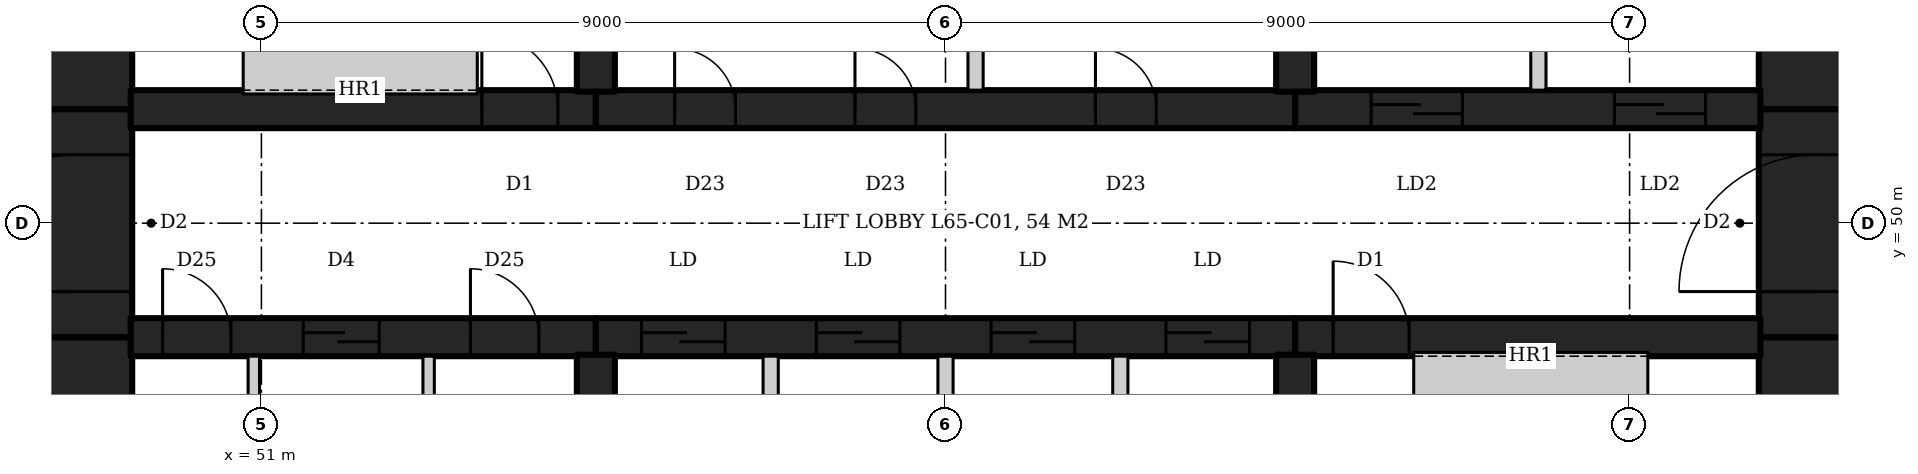
"""IFC4 building model, lengths in metres.
Left out: names, types, materials, properties, quantities, classifications, styles, units other than length and angle.
Written with IfcOpenShell. Run it as: python <this file> out.ifc"""

import sys

from ifc_helpers import new_model, si_unit, direction, frame, frame_2d, origin, place, context, subcontext, project, spatial, rectangle, extrude, element, fill, save


model = new_model("IFC4")
c1 = context("Model", 3, precision=1e-05, world=origin(), true_north=direction((0.0, 1.0)))
c2 = subcontext(c1, "Body", "Model", "MODEL_VIEW")
j1 = project(units=[si_unit("LENGTHUNIT", "METRE"), si_unit("PLANEANGLEUNIT", "RADIAN")], contexts=[c1])
p1 = place(None, origin())
s1 = spatial("IfcSite", under=j1, at=p1, CompositionType="ELEMENT")
p2 = place(p1, origin())
s2 = spatial("IfcBuilding", under=s1, at=p2, CompositionType="ELEMENT")
p3 = place(p2, frame((0.0, 0.0, 278.0)))
s3 = spatial("IfcBuildingStorey", under=s2, at=p3, CompositionType="ELEMENT", Elevation=278.0)
p4 = place(p3, frame((71.45, 45.28, 0.0), z_axis=(0.0, 0.0, 1.0), x_axis=(0.0, 1.0, 0.0)))
e1 = element("IfcWall", 1, at=p4, inside=s3, PredefinedType="SHEAR", context=c2, shape_type="SweptSolid", body=[
    extrude(rectangle(XDim=3.22, YDim=1.5, at=frame_2d((1.61, 0.0))), origin(), (0.0, 0.0, 1.0), 4.2),
])
p5 = place(p3, frame((71.45, 48.5, 0.0), z_axis=(0.0, 0.0, 1.0), x_axis=(0.0, 1.0, 0.0)))
e2 = element("IfcWall", 2, at=p5, inside=s3, PredefinedType="SHEAR", context=c2, shape_type="SweptSolid", body=[
    extrude(rectangle(XDim=3.0, YDim=1.5, at=frame_2d((1.5, 0.0))), origin(), (0.0, 0.0, 1.0), 4.2),
])
p6 = place(p5, frame((0.6, 0.0, 0.0)))
e3 = element("IfcOpeningElement", 3, at=p6, cuts=e2, PredefinedType="OPENING", context=c2, shape_type="SweptSolid", body=[
    extrude(rectangle(XDim=1.8, YDim=2.1, at=frame_2d((0.9, 1.05))), frame((0.0, 0.76, 0.0), z_axis=(0.0, -1.0, 0.0), x_axis=(1.0, 0.0, 0.0)), (0.0, 0.0, 1.0), 1.52),
])
for number, where, z_axis, x_axis in (
    (4, (71.45, 51.5, 0.0), (0.0, 0.0, 1.0), (0.0, 1.0, 0.0)),
    (5, (48.55, 45.28, 0.0), (0.0, 0.0, 1.0), (0.0, 1.0, 0.0)),
):
    element("IfcWall", number, at=place(p3, frame(where, z_axis=z_axis, x_axis=x_axis)), inside=s3, PredefinedType="SHEAR", context=c2, shape_type="SweptSolid", body=[
        extrude(rectangle(XDim=3.22, YDim=1.5, at=frame_2d((1.61, 0.0))), origin(), (0.0, 0.0, 1.0), 4.2),
    ])
p7 = place(p3, frame((48.55, 48.5, 0.0), z_axis=(0.0, 0.0, 1.0), x_axis=(0.0, 1.0, 0.0)))
e6 = element("IfcWall", 6, at=p7, inside=s3, PredefinedType="SHEAR", context=c2, shape_type="SweptSolid", body=[
    extrude(rectangle(XDim=3.0, YDim=1.5, at=frame_2d((1.5, 0.0))), origin(), (0.0, 0.0, 1.0), 4.2),
])
p8 = place(p7, frame((0.6, 0.0, 0.0)))
e7 = element("IfcOpeningElement", 7, at=p8, cuts=e6, PredefinedType="OPENING", context=c2, shape_type="SweptSolid", body=[
    extrude(rectangle(XDim=1.8, YDim=2.1, at=frame_2d((0.9, 1.05))), frame((0.0, 0.76, 0.0), z_axis=(0.0, -1.0, 0.0), x_axis=(1.0, 0.0, 0.0)), (0.0, 0.0, 1.0), 1.52),
])
p9 = place(p3, frame((48.55, 51.5, 0.0), z_axis=(0.0, 0.0, 1.0), x_axis=(0.0, 1.0, 0.0)))
e8 = element("IfcWall", 8, at=p9, inside=s3, PredefinedType="SHEAR", context=c2, shape_type="SweptSolid", body=[
    extrude(rectangle(XDim=3.22, YDim=1.5, at=frame_2d((1.61, 0.0))), origin(), (0.0, 0.0, 1.0), 4.2),
])
p10 = place(p3, frame((49.28, 51.5, 0.0), z_axis=(0.0, 0.0, 1.0), x_axis=(1.0, 0.0, 0.0)))
e9 = element("IfcWall", 9, at=p10, inside=s3, PredefinedType="SHEAR", context=c2, shape_type="SweptSolid", body=[
    extrude(rectangle(XDim=6.12, YDim=0.5, at=frame_2d((3.06, 0.0))), origin(), (0.0, 0.0, 1.0), 4.2),
])
p11 = place(p10, frame((4.62, 0.0, 0.0)))
e10 = element("IfcOpeningElement", 10, at=p11, cuts=e9, PredefinedType="OPENING", context=c2, shape_type="SweptSolid", body=[
    extrude(rectangle(XDim=1.0, YDim=2.1, at=frame_2d((0.5, 1.05))), frame((0.0, 0.26, 0.0), z_axis=(0.0, -1.0, 0.0), x_axis=(1.0, 0.0, 0.0)), (0.0, 0.0, 1.0), 0.52),
])
p12 = place(p3, frame((55.4, 51.5, 0.0), z_axis=(0.0, 0.0, 1.0), x_axis=(1.0, 0.0, 0.0)))
e11 = element("IfcWall", 11, at=p12, inside=s3, PredefinedType="SHEAR", context=c2, shape_type="SweptSolid", body=[
    extrude(rectangle(XDim=9.2, YDim=0.5, at=frame_2d((4.6, 0.0))), origin(), (0.0, 0.0, 1.0), 4.2),
])
p13 = place(p12, frame((1.036, 0.0, 0.0)))
e12 = element("IfcOpeningElement", 12, at=p13, cuts=e11, PredefinedType="OPENING", context=c2, shape_type="SweptSolid", body=[
    extrude(rectangle(XDim=0.8, YDim=2.1, at=frame_2d((0.4, 1.05))), frame((0.0, 0.26, 0.0), z_axis=(0.0, -1.0, 0.0), x_axis=(1.0, 0.0, 0.0)), (0.0, 0.0, 1.0), 0.52),
])
p14 = place(p12, frame((3.409, 0.0, 0.0)))
e13 = element("IfcOpeningElement", 13, at=p14, cuts=e11, PredefinedType="OPENING", context=c2, shape_type="SweptSolid", body=[
    extrude(rectangle(XDim=0.8, YDim=2.1, at=frame_2d((0.4, 1.05))), frame((0.0, 0.26, 0.0), z_axis=(0.0, -1.0, 0.0), x_axis=(1.0, 0.0, 0.0)), (0.0, 0.0, 1.0), 0.52),
])
p15 = place(p12, frame((6.573, 0.0, 0.0)))
e14 = element("IfcOpeningElement", 14, at=p15, cuts=e11, PredefinedType="OPENING", context=c2, shape_type="SweptSolid", body=[
    extrude(rectangle(XDim=0.8, YDim=2.1, at=frame_2d((0.4, 1.05))), frame((0.0, 0.26, 0.0), z_axis=(0.0, -1.0, 0.0), x_axis=(1.0, 0.0, 0.0)), (0.0, 0.0, 1.0), 0.52),
])
p16 = place(p3, frame((64.6, 51.5, 0.0), z_axis=(0.0, 0.0, 1.0), x_axis=(1.0, 0.0, 0.0)))
e15 = element("IfcWall", 15, at=p16, inside=s3, PredefinedType="SHEAR", context=c2, shape_type="SweptSolid", body=[
    extrude(rectangle(XDim=6.12, YDim=0.5, at=frame_2d((3.06, 0.0))), origin(), (0.0, 0.0, 1.0), 4.2),
])
p17 = place(p16, frame((1.0, 0.0, 0.0)))
e16 = element("IfcOpeningElement", 16, at=p17, cuts=e15, PredefinedType="OPENING", context=c2, shape_type="SweptSolid", body=[
    extrude(rectangle(XDim=1.2, YDim=2.1, at=frame_2d((0.6, 1.05))), frame((0.0, 0.26, 0.0), z_axis=(0.0, -1.0, 0.0), x_axis=(1.0, 0.0, 0.0)), (0.0, 0.0, 1.0), 0.52),
])
p18 = place(p16, frame((4.2, 0.0, 0.0)))
e17 = element("IfcOpeningElement", 17, at=p18, cuts=e15, PredefinedType="OPENING", context=c2, shape_type="SweptSolid", body=[
    extrude(rectangle(XDim=1.2, YDim=2.1, at=frame_2d((0.6, 1.05))), frame((0.0, 0.26, 0.0), z_axis=(0.0, -1.0, 0.0), x_axis=(1.0, 0.0, 0.0)), (0.0, 0.0, 1.0), 0.52),
])
p19 = place(p3, frame((49.28, 48.5, 0.0), z_axis=(0.0, 0.0, 1.0), x_axis=(1.0, 0.0, 0.0)))
e18 = element("IfcWall", 18, at=p19, inside=s3, PredefinedType="SHEAR", context=c2, shape_type="SweptSolid", body=[
    extrude(rectangle(XDim=6.12, YDim=0.5, at=frame_2d((3.06, 0.0))), origin(), (0.0, 0.0, 1.0), 4.2),
])
p20 = place(p19, frame((0.42, 0.0, 0.0)))
e19 = element("IfcOpeningElement", 19, at=p20, cuts=e18, PredefinedType="OPENING", context=c2, shape_type="SweptSolid", body=[
    extrude(rectangle(XDim=0.9, YDim=2.1, at=frame_2d((0.45, 1.05))), frame((0.0, 0.26, 0.0), z_axis=(0.0, -1.0, 0.0), x_axis=(1.0, 0.0, 0.0)), (0.0, 0.0, 1.0), 0.52),
])
p21 = place(p19, frame((2.27, 0.0, 0.0)))
e20 = element("IfcOpeningElement", 20, at=p21, cuts=e18, PredefinedType="OPENING", context=c2, shape_type="SweptSolid", body=[
    extrude(rectangle(XDim=1.0, YDim=2.1, at=frame_2d((0.5, 1.05))), frame((0.0, 0.26, 0.0), z_axis=(0.0, -1.0, 0.0), x_axis=(1.0, 0.0, 0.0)), (0.0, 0.0, 1.0), 0.52),
])
p22 = place(p19, frame((4.47, 0.0, 0.0)))
e21 = element("IfcOpeningElement", 21, at=p22, cuts=e18, PredefinedType="OPENING", context=c2, shape_type="SweptSolid", body=[
    extrude(rectangle(XDim=0.9, YDim=2.1, at=frame_2d((0.45, 1.05))), frame((0.0, 0.26, 0.0), z_axis=(0.0, -1.0, 0.0), x_axis=(1.0, 0.0, 0.0)), (0.0, 0.0, 1.0), 0.52),
])
p23 = place(p3, frame((55.4, 48.5, 0.0), z_axis=(0.0, 0.0, 1.0), x_axis=(1.0, 0.0, 0.0)))
e22 = element("IfcWall", 22, at=p23, inside=s3, PredefinedType="SHEAR", context=c2, shape_type="SweptSolid", body=[
    extrude(rectangle(XDim=9.2, YDim=0.5, at=frame_2d((4.6, 0.0))), origin(), (0.0, 0.0, 1.0), 4.2),
])
p24 = place(p23, frame((0.6, 0.0, 0.0)))
e23 = element("IfcOpeningElement", 23, at=p24, cuts=e22, PredefinedType="OPENING", context=c2, shape_type="SweptSolid", body=[
    extrude(rectangle(XDim=1.1, YDim=2.1, at=frame_2d((0.55, 1.05))), frame((0.0, 0.26, 0.0), z_axis=(0.0, -1.0, 0.0), x_axis=(1.0, 0.0, 0.0)), (0.0, 0.0, 1.0), 0.52),
])
p25 = place(p23, frame((2.9, 0.0, 0.0)))
e24 = element("IfcOpeningElement", 24, at=p25, cuts=e22, PredefinedType="OPENING", context=c2, shape_type="SweptSolid", body=[
    extrude(rectangle(XDim=1.1, YDim=2.1, at=frame_2d((0.55, 1.05))), frame((0.0, 0.26, 0.0), z_axis=(0.0, -1.0, 0.0), x_axis=(1.0, 0.0, 0.0)), (0.0, 0.0, 1.0), 0.52),
])
p26 = place(p23, frame((5.2, 0.0, 0.0)))
e25 = element("IfcOpeningElement", 25, at=p26, cuts=e22, PredefinedType="OPENING", context=c2, shape_type="SweptSolid", body=[
    extrude(rectangle(XDim=1.1, YDim=2.1, at=frame_2d((0.55, 1.05))), frame((0.0, 0.26, 0.0), z_axis=(0.0, -1.0, 0.0), x_axis=(1.0, 0.0, 0.0)), (0.0, 0.0, 1.0), 0.52),
])
p27 = place(p23, frame((7.5, 0.0, 0.0)))
e26 = element("IfcOpeningElement", 26, at=p27, cuts=e22, PredefinedType="OPENING", context=c2, shape_type="SweptSolid", body=[
    extrude(rectangle(XDim=1.1, YDim=2.1, at=frame_2d((0.55, 1.05))), frame((0.0, 0.26, 0.0), z_axis=(0.0, -1.0, 0.0), x_axis=(1.0, 0.0, 0.0)), (0.0, 0.0, 1.0), 0.52),
])
p28 = place(p3, frame((64.6, 48.5, 0.0), z_axis=(0.0, 0.0, 1.0), x_axis=(1.0, 0.0, 0.0)))
e27 = element("IfcWall", 27, at=p28, inside=s3, PredefinedType="SHEAR", context=c2, shape_type="SweptSolid", body=[
    extrude(rectangle(XDim=6.12, YDim=0.5, at=frame_2d((3.06, 0.0))), origin(), (0.0, 0.0, 1.0), 4.2),
])
p29 = place(p28, frame((0.5, 0.0, 0.0)))
e28 = element("IfcOpeningElement", 28, at=p29, cuts=e27, PredefinedType="OPENING", context=c2, shape_type="SweptSolid", body=[
    extrude(rectangle(XDim=1.0, YDim=2.1, at=frame_2d((0.5, 1.05))), frame((0.0, 0.26, 0.0), z_axis=(0.0, -1.0, 0.0), x_axis=(1.0, 0.0, 0.0)), (0.0, 0.0, 1.0), 0.52),
])
for number, where, z_axis, x_axis in (
    (29, (55.4, 51.73, 0.0), (0.0, 0.0, 1.0), (0.0, 1.0, 0.0)),
    (30, (64.6, 51.73, 0.0), (0.0, 0.0, 1.0), (0.0, 1.0, 0.0)),
    (31, (55.4, 48.27, 0.0), (0.0, 0.0, 1.0), (0.0, -1.0, 0.0)),
    (32, (64.6, 48.27, 0.0), (0.0, 0.0, 1.0), (0.0, -1.0, 0.0)),
):
    element("IfcWall", number, at=place(p3, frame(where, z_axis=z_axis, x_axis=x_axis)), inside=s3, PredefinedType="SHEAR", context=c2, shape_type="SweptSolid", body=[
        extrude(rectangle(XDim=2.99, YDim=0.5, at=frame_2d((1.495, 0.0))), origin(), (0.0, 0.0, 1.0), 4.2),
    ])
for number, where, z_axis, x_axis in (
    (33, (57.7, 45.3, 0.0), (0.0, 0.0, 1.0), (0.0, 1.0, 0.0)),
    (34, (60.0, 45.3, 0.0), (0.0, 0.0, 1.0), (0.0, 1.0, 0.0)),
    (35, (62.3, 45.3, 0.0), (0.0, 0.0, 1.0), (0.0, 1.0, 0.0)),
    (36, (67.8, 51.75, 0.0), (0.0, 0.0, 1.0), (0.0, 1.0, 0.0)),
):
    element("IfcWall", number, at=place(p3, frame(where, z_axis=z_axis, x_axis=x_axis)), inside=s3, PredefinedType="PARTITIONING", context=c2, shape_type="SweptSolid", body=[
        extrude(rectangle(XDim=2.95, YDim=0.2, at=frame_2d((1.475, 0.0))), origin(), (0.0, 0.0, 1.0), 4.2),
    ])
for number, where, z_axis, x_axis in (
    (37, (50.9, 45.3, 0.0), (0.0, 0.0, 1.0), (0.0, 1.0, 0.0)),
    (38, (53.2, 45.3, 0.0), (0.0, 0.0, 1.0), (0.0, 1.0, 0.0)),
):
    element("IfcWall", number, at=place(p3, frame(where, z_axis=z_axis, x_axis=x_axis)), inside=s3, PredefinedType="PARTITIONING", context=c2, shape_type="SweptSolid", body=[
        extrude(rectangle(XDim=2.95, YDim=0.15, at=frame_2d((1.475, 0.0))), origin(), (0.0, 0.0, 1.0), 4.04),
    ])
p30 = place(p3, frame((60.396, 51.75, 0.0), z_axis=(0.0, 0.0, 1.0), x_axis=(0.0, 1.0, 0.0)))
e39 = element("IfcWall", 39, at=p30, inside=s3, PredefinedType="PARTITIONING", context=c2, shape_type="SweptSolid", body=[
    extrude(rectangle(XDim=2.95, YDim=0.2, at=frame_2d((1.475, 0.0))), origin(), (0.0, 0.0, 1.0), 4.04),
])
p31 = place(p11, origin())
e40 = element("IfcDoor", 40, at=p31, inside=s3, OperationType="SINGLE_SWING_LEFT", PredefinedType="DOOR", context=c2, shape_type="SweptSolid", body=[
    extrude(rectangle(XDim=1.0, YDim=2.1, at=frame_2d((0.5, 1.05))), frame((0.0, 0.025, 0.0), z_axis=(0.0, -1.0, 0.0), x_axis=(1.0, 0.0, 0.0)), (0.0, 0.0, 1.0), 0.05),
])
fill(e10, e40)
p32 = place(p29, origin())
e41 = element("IfcDoor", 41, at=p32, inside=s3, OperationType="SINGLE_SWING_LEFT", PredefinedType="DOOR", context=c2, shape_type="SweptSolid", body=[
    extrude(rectangle(XDim=1.0, YDim=2.1, at=frame_2d((0.5, 1.05))), frame((0.0, 0.025, 0.0), z_axis=(0.0, -1.0, 0.0), x_axis=(1.0, 0.0, 0.0)), (0.0, 0.0, 1.0), 0.05),
])
fill(e28, e41)
p33 = place(p17, origin())
e42 = element("IfcDoor", 42, at=p33, inside=s3, OperationType="SLIDING_TO_LEFT", PredefinedType="DOOR", context=c2, shape_type="SweptSolid", body=[
    extrude(rectangle(XDim=1.2, YDim=2.1, at=frame_2d((0.6, 1.05))), frame((0.0, 0.025, 0.0), z_axis=(0.0, -1.0, 0.0), x_axis=(1.0, 0.0, 0.0)), (0.0, 0.0, 1.0), 0.05),
])
fill(e16, e42)
p34 = place(p18, origin())
e43 = element("IfcDoor", 43, at=p34, inside=s3, OperationType="SLIDING_TO_LEFT", PredefinedType="DOOR", context=c2, shape_type="SweptSolid", body=[
    extrude(rectangle(XDim=1.2, YDim=2.1, at=frame_2d((0.6, 1.05))), frame((0.0, 0.025, 0.0), z_axis=(0.0, -1.0, 0.0), x_axis=(1.0, 0.0, 0.0)), (0.0, 0.0, 1.0), 0.05),
])
fill(e17, e43)
p35 = place(p24, origin())
e44 = element("IfcDoor", 44, at=p35, inside=s3, OperationType="SLIDING_TO_LEFT", PredefinedType="DOOR", context=c2, shape_type="SweptSolid", body=[
    extrude(rectangle(XDim=1.1, YDim=2.1, at=frame_2d((0.55, 1.05))), frame((0.0, 0.025, 0.0), z_axis=(0.0, -1.0, 0.0), x_axis=(1.0, 0.0, 0.0)), (0.0, 0.0, 1.0), 0.05),
])
fill(e23, e44)
p36 = place(p25, origin())
e45 = element("IfcDoor", 45, at=p36, inside=s3, OperationType="SLIDING_TO_LEFT", PredefinedType="DOOR", context=c2, shape_type="SweptSolid", body=[
    extrude(rectangle(XDim=1.1, YDim=2.1, at=frame_2d((0.55, 1.05))), frame((0.0, 0.025, 0.0), z_axis=(0.0, -1.0, 0.0), x_axis=(1.0, 0.0, 0.0)), (0.0, 0.0, 1.0), 0.05),
])
fill(e24, e45)
p37 = place(p26, origin())
e46 = element("IfcDoor", 46, at=p37, inside=s3, OperationType="SLIDING_TO_LEFT", PredefinedType="DOOR", context=c2, shape_type="SweptSolid", body=[
    extrude(rectangle(XDim=1.1, YDim=2.1, at=frame_2d((0.55, 1.05))), frame((0.0, 0.025, 0.0), z_axis=(0.0, -1.0, 0.0), x_axis=(1.0, 0.0, 0.0)), (0.0, 0.0, 1.0), 0.05),
])
fill(e25, e46)
p38 = place(p27, origin())
e47 = element("IfcDoor", 47, at=p38, inside=s3, OperationType="SLIDING_TO_LEFT", PredefinedType="DOOR", context=c2, shape_type="SweptSolid", body=[
    extrude(rectangle(XDim=1.1, YDim=2.1, at=frame_2d((0.55, 1.05))), frame((0.0, 0.025, 0.0), z_axis=(0.0, -1.0, 0.0), x_axis=(1.0, 0.0, 0.0)), (0.0, 0.0, 1.0), 0.05),
])
fill(e26, e47)
p39 = place(p20, origin())
e48 = element("IfcDoor", 48, at=p39, inside=s3, OperationType="SINGLE_SWING_RIGHT", PredefinedType="DOOR", context=c2, shape_type="SweptSolid", body=[
    extrude(rectangle(XDim=0.9, YDim=2.1, at=frame_2d((0.45, 1.05))), frame((0.0, 0.025, 0.0), z_axis=(0.0, -1.0, 0.0), x_axis=(1.0, 0.0, 0.0)), (0.0, 0.0, 1.0), 0.05),
])
fill(e19, e48)
p40 = place(p21, origin())
e49 = element("IfcDoor", 49, at=p40, inside=s3, OperationType="SLIDING_TO_LEFT", PredefinedType="DOOR", context=c2, shape_type="SweptSolid", body=[
    extrude(rectangle(XDim=1.0, YDim=2.1, at=frame_2d((0.5, 1.05))), frame((0.0, 0.025, 0.0), z_axis=(0.0, -1.0, 0.0), x_axis=(1.0, 0.0, 0.0)), (0.0, 0.0, 1.0), 0.05),
])
fill(e20, e49)
p41 = place(p22, origin())
e50 = element("IfcDoor", 50, at=p41, inside=s3, OperationType="SINGLE_SWING_RIGHT", PredefinedType="DOOR", context=c2, shape_type="SweptSolid", body=[
    extrude(rectangle(XDim=0.9, YDim=2.1, at=frame_2d((0.45, 1.05))), frame((0.0, 0.025, 0.0), z_axis=(0.0, -1.0, 0.0), x_axis=(1.0, 0.0, 0.0)), (0.0, 0.0, 1.0), 0.05),
])
fill(e21, e50)
p42 = place(p6, origin())
e51 = element("IfcDoor", 51, at=p42, inside=s3, OperationType="DOUBLE_DOOR_DOUBLE_SWING", PredefinedType="DOOR", context=c2, shape_type="SweptSolid", body=[
    extrude(rectangle(XDim=1.8, YDim=2.1, at=frame_2d((0.9, 1.05))), frame((0.0, 0.025, 0.0), z_axis=(0.0, -1.0, 0.0), x_axis=(1.0, 0.0, 0.0)), (0.0, 0.0, 1.0), 0.05),
])
fill(e3, e51)
p43 = place(p8, origin())
e52 = element("IfcDoor", 52, at=p43, inside=s3, OperationType="DOUBLE_DOOR_DOUBLE_SWING", PredefinedType="DOOR", context=c2, shape_type="SweptSolid", body=[
    extrude(rectangle(XDim=1.8, YDim=2.1, at=frame_2d((0.9, 1.05))), frame((0.0, 0.025, 0.0), z_axis=(0.0, -1.0, 0.0), x_axis=(1.0, 0.0, 0.0)), (0.0, 0.0, 1.0), 0.05),
])
fill(e7, e52)
p44 = place(p13, origin())
e53 = element("IfcDoor", 53, at=p44, inside=s3, OperationType="SINGLE_SWING_LEFT", PredefinedType="DOOR", context=c2, shape_type="SweptSolid", body=[
    extrude(rectangle(XDim=0.8, YDim=2.1, at=frame_2d((0.4, 1.05))), frame((0.0, 0.025, 0.0), z_axis=(0.0, -1.0, 0.0), x_axis=(1.0, 0.0, 0.0)), (0.0, 0.0, 1.0), 0.05),
])
fill(e12, e53)
p45 = place(p14, origin())
e54 = element("IfcDoor", 54, at=p45, inside=s3, OperationType="SINGLE_SWING_LEFT", PredefinedType="DOOR", context=c2, shape_type="SweptSolid", body=[
    extrude(rectangle(XDim=0.8, YDim=2.1, at=frame_2d((0.4, 1.05))), frame((0.0, 0.025, 0.0), z_axis=(0.0, -1.0, 0.0), x_axis=(1.0, 0.0, 0.0)), (0.0, 0.0, 1.0), 0.05),
])
fill(e13, e54)
p46 = place(p15, origin())
e55 = element("IfcDoor", 55, at=p46, inside=s3, OperationType="SINGLE_SWING_LEFT", PredefinedType="DOOR", context=c2, shape_type="SweptSolid", body=[
    extrude(rectangle(XDim=0.8, YDim=2.1, at=frame_2d((0.4, 1.05))), frame((0.0, 0.025, 0.0), z_axis=(0.0, -1.0, 0.0), x_axis=(1.0, 0.0, 0.0)), (0.0, 0.0, 1.0), 0.05),
])
fill(e14, e55)
save(model, sys.argv[1])
